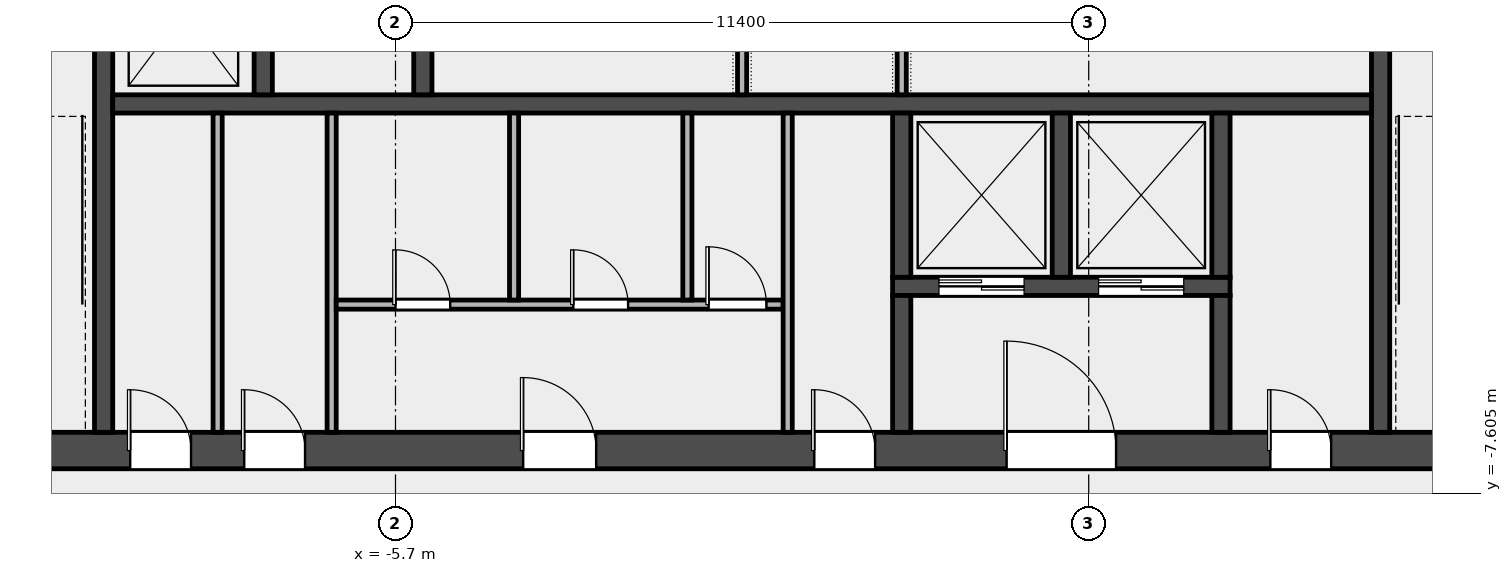
"""IFC4 building model, lengths in metres.
Left out: names, types, materials, properties, quantities, classifications, styles, units other than length and angle.
Written with IfcOpenShell. Run it as: python <this file> out.ifc"""

import sys

from ifc_helpers import new_model, si_unit, direction, frame, frame_2d, origin, place, context, subcontext, project, spatial, rectangle, extrude, element, fill, save


model = new_model("IFC4")
c1 = context("Model", 3, precision=1e-05, world=origin(), true_north=direction((0.0, 1.0)))
c2 = subcontext(c1, "Body", "Model", "MODEL_VIEW")
j1 = project(units=[si_unit("LENGTHUNIT", "METRE"), si_unit("PLANEANGLEUNIT", "RADIAN")], contexts=[c1])
p1 = place(None, origin())
s1 = spatial("IfcSite", under=j1, at=p1, CompositionType="ELEMENT")
p2 = place(p1, origin())
s2 = spatial("IfcBuilding", under=s1, at=p2, CompositionType="ELEMENT")
p3 = place(p2, frame((0.0, 0.0, 303.4)))
s3 = spatial("IfcBuildingStorey", under=s2, at=p3, CompositionType="ELEMENT", Elevation=303.4)
p4 = place(p3, frame((-14.4, -6.9, 0.0), z_axis=(0.0, 0.0, 1.0), x_axis=(1.0, 0.0, 0.0)))
e1 = element("IfcWall", 1, at=p4, inside=s3, PredefinedType="SHEAR", context=c2, shape_type="SweptSolid", body=[
    extrude(rectangle(XDim=28.8, YDim=0.6, at=frame_2d((14.4, 0.0))), origin(), (0.0, 0.0, 1.0), 3.7),
])
p5 = place(p4, frame((4.337, 0.0, 0.0)))
e2 = element("IfcOpeningElement", 2, at=p5, cuts=e1, PredefinedType="OPENING", context=c2, shape_type="SweptSolid", body=[
    extrude(rectangle(XDim=1.0, YDim=2.1, at=frame_2d((0.5, 1.05))), frame((0.0, 0.312, 0.0), z_axis=(0.0, -1.0, 0.0), x_axis=(1.0, 0.0, 0.0)), (0.0, 0.0, 1.0), 0.624),
])
p6 = place(p4, frame((6.212, 0.0, 0.0)))
e3 = element("IfcOpeningElement", 3, at=p6, cuts=e1, PredefinedType="OPENING", context=c2, shape_type="SweptSolid", body=[
    extrude(rectangle(XDim=1.0, YDim=2.1, at=frame_2d((0.5, 1.05))), frame((0.0, 0.312, 0.0), z_axis=(0.0, -1.0, 0.0), x_axis=(1.0, 0.0, 0.0)), (0.0, 0.0, 1.0), 0.624),
])
p7 = place(p4, frame((10.8, 0.0, 0.0)))
e4 = element("IfcOpeningElement", 4, at=p7, cuts=e1, PredefinedType="OPENING", context=c2, shape_type="SweptSolid", body=[
    extrude(rectangle(XDim=1.2, YDim=2.1, at=frame_2d((0.6, 1.05))), frame((0.0, 0.312, 0.0), z_axis=(0.0, -1.0, 0.0), x_axis=(1.0, 0.0, 0.0)), (0.0, 0.0, 1.0), 0.624),
])
p8 = place(p4, frame((15.587, 0.0, 0.0)))
e5 = element("IfcOpeningElement", 5, at=p8, cuts=e1, PredefinedType="OPENING", context=c2, shape_type="SweptSolid", body=[
    extrude(rectangle(XDim=1.0, YDim=2.1, at=frame_2d((0.5, 1.05))), frame((0.0, 0.312, 0.0), z_axis=(0.0, -1.0, 0.0), x_axis=(1.0, 0.0, 0.0)), (0.0, 0.0, 1.0), 0.624),
])
p9 = place(p4, frame((18.75, 0.0, 0.0)))
e6 = element("IfcOpeningElement", 6, at=p9, cuts=e1, PredefinedType="OPENING", context=c2, shape_type="SweptSolid", body=[
    extrude(rectangle(XDim=1.8, YDim=2.1, at=frame_2d((0.9, 1.05))), frame((0.0, 0.312, 0.0), z_axis=(0.0, -1.0, 0.0), x_axis=(1.0, 0.0, 0.0)), (0.0, 0.0, 1.0), 0.624),
])
p10 = place(p4, frame((23.087, 0.0, 0.0)))
e7 = element("IfcOpeningElement", 7, at=p10, cuts=e1, PredefinedType="OPENING", context=c2, shape_type="SweptSolid", body=[
    extrude(rectangle(XDim=1.0, YDim=2.1, at=frame_2d((0.5, 1.05))), frame((0.0, 0.312, 0.0), z_axis=(0.0, -1.0, 0.0), x_axis=(1.0, 0.0, 0.0)), (0.0, 0.0, 1.0), 0.624),
])
for number, where, z_axis, x_axis in (
    (8, (-10.5, -6.6, 0.0), (0.0, 0.0, 1.0), (0.0, 1.0, 0.0)),
    (9, (10.5, -6.6, 0.0), (0.0, 0.0, 1.0), (0.0, 1.0, 0.0)),
):
    element("IfcWall", number, at=place(p3, frame(where, z_axis=z_axis, x_axis=x_axis)), inside=s3, PredefinedType="SHEAR", context=c2, shape_type="SweptSolid", body=[
        extrude(rectangle(XDim=8.55, YDim=0.3, at=frame_2d((4.275, 0.0))), origin(), (0.0, 0.0, 1.0), 3.7),
    ])
p11 = place(p3, frame((-10.35, -1.2, 0.0), z_axis=(0.0, 0.0, 1.0), x_axis=(1.0, 0.0, 0.0)))
e10 = element("IfcWall", 10, at=p11, inside=s3, PredefinedType="SOLIDWALL", context=c2, shape_type="SweptSolid", body=[
    extrude(rectangle(XDim=20.7, YDim=0.3, at=frame_2d((10.35, 0.0))), origin(), (0.0, 0.0, 1.0), 3.7),
])
for number, where, z_axis, x_axis in (
    (11, (-7.875, -1.05, 0.0), (0.0, 0.0, 1.0), (0.0, 1.0, 0.0)),
    (12, (-5.25, -1.05, 0.0), (0.0, 0.0, 1.0), (0.0, 1.0, 0.0)),
):
    element("IfcWall", number, at=place(p3, frame(where, z_axis=z_axis, x_axis=x_axis)), inside=s3, PredefinedType="SOLIDWALL", context=c2, shape_type="SweptSolid", body=[
        extrude(rectangle(XDim=2.7, YDim=0.3, at=frame_2d((1.35, 0.0))), origin(), (0.0, 0.0, 1.0), 3.7),
    ])
p12 = place(p3, frame((2.475, -4.2, 0.0), z_axis=(0.0, 0.0, 1.0), x_axis=(1.0, 0.0, 0.0)))
e13 = element("IfcWall", 13, at=p12, inside=s3, PredefinedType="SOLIDWALL", context=c2, shape_type="SweptSolid", body=[
    extrude(rectangle(XDim=5.55, YDim=0.3, at=frame_2d((2.775, 0.0))), origin(), (0.0, 0.0, 1.0), 3.7),
])
p13 = place(p12, frame((0.762, 0.0, 0.0)))
e14 = element("IfcOpeningElement", 14, at=p13, cuts=e13, PredefinedType="OPENING", context=c2, shape_type="SweptSolid", body=[
    extrude(rectangle(XDim=1.4, YDim=2.1, at=frame_2d((0.7, 1.05))), frame((0.0, 0.162, 0.0), z_axis=(0.0, -1.0, 0.0), x_axis=(1.0, 0.0, 0.0)), (0.0, 0.0, 1.0), 0.324),
])
p14 = place(p12, frame((3.387, 0.0, 0.0)))
e15 = element("IfcOpeningElement", 15, at=p14, cuts=e13, PredefinedType="OPENING", context=c2, shape_type="SweptSolid", body=[
    extrude(rectangle(XDim=1.4, YDim=2.1, at=frame_2d((0.7, 1.05))), frame((0.0, 0.162, 0.0), z_axis=(0.0, -1.0, 0.0), x_axis=(1.0, 0.0, 0.0)), (0.0, 0.0, 1.0), 0.324),
])
p15 = place(p3, frame((2.625, -4.05, 0.0), z_axis=(0.0, 0.0, 1.0), x_axis=(0.0, 1.0, 0.0)))
e16 = element("IfcWall", 16, at=p15, inside=s3, PredefinedType="SOLIDWALL", context=c2, shape_type="SweptSolid", body=[
    extrude(rectangle(XDim=2.7, YDim=0.3, at=frame_2d((1.35, 0.0))), origin(), (0.0, 0.0, 1.0), 3.7),
])
p16 = place(p3, frame((2.625, -6.6, 0.0), z_axis=(0.0, 0.0, 1.0), x_axis=(0.0, 1.0, 0.0)))
e17 = element("IfcWall", 17, at=p16, inside=s3, PredefinedType="SOLIDWALL", context=c2, shape_type="SweptSolid", body=[
    extrude(rectangle(XDim=2.25, YDim=0.3, at=frame_2d((1.125, 0.0))), origin(), (0.0, 0.0, 1.0), 3.7),
])
for number, where, z_axis, x_axis in (
    (18, (5.25, -4.05, 0.0), (0.0, 0.0, 1.0), (0.0, 1.0, 0.0)),
    (19, (7.875, -4.05, 0.0), (0.0, 0.0, 1.0), (0.0, 1.0, 0.0)),
):
    element("IfcWall", number, at=place(p3, frame(where, z_axis=z_axis, x_axis=x_axis)), inside=s3, PredefinedType="SOLIDWALL", context=c2, shape_type="SweptSolid", body=[
        extrude(rectangle(XDim=2.7, YDim=0.3, at=frame_2d((1.35, 0.0))), origin(), (0.0, 0.0, 1.0), 3.7),
    ])
p17 = place(p3, frame((7.875, -6.6, 0.0), z_axis=(0.0, 0.0, 1.0), x_axis=(0.0, 1.0, 0.0)))
e20 = element("IfcWall", 20, at=p17, inside=s3, PredefinedType="SOLIDWALL", context=c2, shape_type="SweptSolid", body=[
    extrude(rectangle(XDim=2.25, YDim=0.3, at=frame_2d((1.125, 0.0))), origin(), (0.0, 0.0, 1.0), 3.7),
])
for number, where, z_axis, x_axis in (
    (21, (-8.625, -6.6, 0.0), (0.0, 0.0, 1.0), (0.0, 1.0, 0.0)),
    (22, (-6.75, -6.6, 0.0), (0.0, 0.0, 1.0), (0.0, 1.0, 0.0)),
):
    element("IfcWall", number, at=place(p3, frame(where, z_axis=z_axis, x_axis=x_axis)), inside=s3, PredefinedType="PARTITIONING", context=c2, shape_type="SweptSolid", body=[
        extrude(rectangle(XDim=5.25, YDim=0.15, at=frame_2d((2.625, 0.0))), origin(), (0.0, 0.0, 1.0), 3.7),
    ])
p18 = place(p3, frame((-6.675, -4.5, 0.0), z_axis=(0.0, 0.0, 1.0), x_axis=(1.0, 0.0, 0.0)))
e23 = element("IfcWall", 23, at=p18, inside=s3, PredefinedType="PARTITIONING", context=c2, shape_type="SweptSolid", body=[
    extrude(rectangle(XDim=7.35, YDim=0.15, at=frame_2d((3.675, 0.0))), origin(), (0.0, 0.0, 1.0), 3.7),
])
p19 = place(p18, frame((0.975, 0.0, 0.0)))
e24 = element("IfcOpeningElement", 24, at=p19, cuts=e23, PredefinedType="OPENING", context=c2, shape_type="SweptSolid", body=[
    extrude(rectangle(XDim=0.9, YDim=2.1, at=frame_2d((0.45, 1.05))), frame((0.0, 0.087, 0.0), z_axis=(0.0, -1.0, 0.0), x_axis=(1.0, 0.0, 0.0)), (0.0, 0.0, 1.0), 0.174),
])
p20 = place(p18, frame((3.9, 0.0, 0.0)))
e25 = element("IfcOpeningElement", 25, at=p20, cuts=e23, PredefinedType="OPENING", context=c2, shape_type="SweptSolid", body=[
    extrude(rectangle(XDim=0.9, YDim=2.1, at=frame_2d((0.45, 1.05))), frame((0.0, 0.087, 0.0), z_axis=(0.0, -1.0, 0.0), x_axis=(1.0, 0.0, 0.0)), (0.0, 0.0, 1.0), 0.174),
])
p21 = place(p18, frame((6.125, 0.0, 0.0)))
e26 = element("IfcOpeningElement", 26, at=p21, cuts=e23, PredefinedType="OPENING", context=c2, shape_type="SweptSolid", body=[
    extrude(rectangle(XDim=0.95, YDim=2.1, at=frame_2d((0.475, 1.05))), frame((0.0, 0.087, 0.0), z_axis=(0.0, -1.0, 0.0), x_axis=(1.0, 0.0, 0.0)), (0.0, 0.0, 1.0), 0.174),
])
for number, where, z_axis, x_axis in (
    (27, (-3.75, -4.425, 0.0), (0.0, 0.0, 1.0), (0.0, 1.0, 0.0)),
    (28, (-0.9, -4.425, 0.0), (0.0, 0.0, 1.0), (0.0, 1.0, 0.0)),
):
    element("IfcWall", number, at=place(p3, frame(where, z_axis=z_axis, x_axis=x_axis)), inside=s3, PredefinedType="PARTITIONING", context=c2, shape_type="SweptSolid", body=[
        extrude(rectangle(XDim=3.075, YDim=0.15, at=frame_2d((1.538, 0.0))), origin(), (0.0, 0.0, 1.0), 3.7),
    ])
p22 = place(p3, frame((0.75, -6.6, 0.0), z_axis=(0.0, 0.0, 1.0), x_axis=(0.0, 1.0, 0.0)))
e29 = element("IfcWall", 29, at=p22, inside=s3, PredefinedType="PARTITIONING", context=c2, shape_type="SweptSolid", body=[
    extrude(rectangle(XDim=5.25, YDim=0.15, at=frame_2d((2.625, 0.0))), origin(), (0.0, 0.0, 1.0), 3.7),
])
for number, where, z_axis, x_axis in (
    (30, (0.0, -1.05, 0.0), (0.0, 0.0, 1.0), (0.0, 1.0, 0.0)),
    (31, (2.625, -1.05, 0.0), (0.0, 0.0, 1.0), (0.0, 1.0, 0.0)),
):
    element("IfcWall", number, at=place(p3, frame(where, z_axis=z_axis, x_axis=x_axis)), inside=s3, PredefinedType="PARTITIONING", context=c2, shape_type="SweptSolid", body=[
        extrude(rectangle(XDim=2.7, YDim=0.15, at=frame_2d((1.35, 0.0))), origin(), (0.0, 0.0, 1.0), 3.7),
    ])
p23 = place(p13, origin())
e32 = element("IfcDoor", 32, at=p23, inside=s3, OperationType="DOUBLE_DOOR_SLIDING", PredefinedType="DOOR", context=c2, shape_type="SweptSolid", body=[
    extrude(rectangle(XDim=1.4, YDim=2.1, at=frame_2d((0.7, 1.05))), frame((0.0, 0.025, 0.0), z_axis=(0.0, -1.0, 0.0), x_axis=(1.0, 0.0, 0.0)), (0.0, 0.0, 1.0), 0.05),
])
fill(e14, e32)
p24 = place(p14, origin())
e33 = element("IfcDoor", 33, at=p24, inside=s3, OperationType="DOUBLE_DOOR_SLIDING", PredefinedType="DOOR", context=c2, shape_type="SweptSolid", body=[
    extrude(rectangle(XDim=1.4, YDim=2.1, at=frame_2d((0.7, 1.05))), frame((0.0, 0.025, 0.0), z_axis=(0.0, -1.0, 0.0), x_axis=(1.0, 0.0, 0.0)), (0.0, 0.0, 1.0), 0.05),
])
fill(e15, e33)
p25 = place(p5, origin())
e34 = element("IfcDoor", 34, at=p25, inside=s3, OperationType="SINGLE_SWING_LEFT", PredefinedType="DOOR", context=c2, shape_type="SweptSolid", body=[
    extrude(rectangle(XDim=1.0, YDim=2.1, at=frame_2d((0.5, 1.05))), frame((0.0, 0.025, 0.0), z_axis=(0.0, -1.0, 0.0), x_axis=(1.0, 0.0, 0.0)), (0.0, 0.0, 1.0), 0.05),
])
fill(e2, e34)
p26 = place(p6, origin())
e35 = element("IfcDoor", 35, at=p26, inside=s3, OperationType="SINGLE_SWING_LEFT", PredefinedType="DOOR", context=c2, shape_type="SweptSolid", body=[
    extrude(rectangle(XDim=1.0, YDim=2.1, at=frame_2d((0.5, 1.05))), frame((0.0, 0.025, 0.0), z_axis=(0.0, -1.0, 0.0), x_axis=(1.0, 0.0, 0.0)), (0.0, 0.0, 1.0), 0.05),
])
fill(e3, e35)
p27 = place(p7, origin())
e36 = element("IfcDoor", 36, at=p27, inside=s3, OperationType="SINGLE_SWING_LEFT", PredefinedType="DOOR", context=c2, shape_type="SweptSolid", body=[
    extrude(rectangle(XDim=1.2, YDim=2.1, at=frame_2d((0.6, 1.05))), frame((0.0, 0.025, 0.0), z_axis=(0.0, -1.0, 0.0), x_axis=(1.0, 0.0, 0.0)), (0.0, 0.0, 1.0), 0.05),
])
fill(e4, e36)
p28 = place(p19, origin())
e37 = element("IfcDoor", 37, at=p28, inside=s3, OperationType="SINGLE_SWING_LEFT", PredefinedType="DOOR", context=c2, shape_type="SweptSolid", body=[
    extrude(rectangle(XDim=0.9, YDim=2.1, at=frame_2d((0.45, 1.05))), frame((0.0, 0.025, 0.0), z_axis=(0.0, -1.0, 0.0), x_axis=(1.0, 0.0, 0.0)), (0.0, 0.0, 1.0), 0.05),
])
fill(e24, e37)
p29 = place(p20, origin())
e38 = element("IfcDoor", 38, at=p29, inside=s3, OperationType="SINGLE_SWING_LEFT", PredefinedType="DOOR", context=c2, shape_type="SweptSolid", body=[
    extrude(rectangle(XDim=0.9, YDim=2.1, at=frame_2d((0.45, 1.05))), frame((0.0, 0.025, 0.0), z_axis=(0.0, -1.0, 0.0), x_axis=(1.0, 0.0, 0.0)), (0.0, 0.0, 1.0), 0.05),
])
fill(e25, e38)
p30 = place(p21, origin())
e39 = element("IfcDoor", 39, at=p30, inside=s3, OperationType="SINGLE_SWING_LEFT", PredefinedType="DOOR", context=c2, shape_type="SweptSolid", body=[
    extrude(rectangle(XDim=0.95, YDim=2.1, at=frame_2d((0.475, 1.05))), frame((0.0, 0.025, 0.0), z_axis=(0.0, -1.0, 0.0), x_axis=(1.0, 0.0, 0.0)), (0.0, 0.0, 1.0), 0.05),
])
fill(e26, e39)
p31 = place(p8, origin())
e40 = element("IfcDoor", 40, at=p31, inside=s3, OperationType="SINGLE_SWING_LEFT", PredefinedType="DOOR", context=c2, shape_type="SweptSolid", body=[
    extrude(rectangle(XDim=1.0, YDim=2.1, at=frame_2d((0.5, 1.05))), frame((0.0, 0.025, 0.0), z_axis=(0.0, -1.0, 0.0), x_axis=(1.0, 0.0, 0.0)), (0.0, 0.0, 1.0), 0.05),
])
fill(e5, e40)
p32 = place(p9, origin())
e41 = element("IfcDoor", 41, at=p32, inside=s3, OperationType="DOUBLE_DOOR_SINGLE_SWING", PredefinedType="DOOR", context=c2, shape_type="SweptSolid", body=[
    extrude(rectangle(XDim=1.8, YDim=2.1, at=frame_2d((0.9, 1.05))), frame((0.0, 0.025, 0.0), z_axis=(0.0, -1.0, 0.0), x_axis=(1.0, 0.0, 0.0)), (0.0, 0.0, 1.0), 0.05),
])
fill(e6, e41)
p33 = place(p10, origin())
e42 = element("IfcDoor", 42, at=p33, inside=s3, OperationType="SINGLE_SWING_LEFT", PredefinedType="DOOR", context=c2, shape_type="SweptSolid", body=[
    extrude(rectangle(XDim=1.0, YDim=2.1, at=frame_2d((0.5, 1.05))), frame((0.0, 0.025, 0.0), z_axis=(0.0, -1.0, 0.0), x_axis=(1.0, 0.0, 0.0)), (0.0, 0.0, 1.0), 0.05),
])
fill(e7, e42)
save(model, sys.argv[1])
